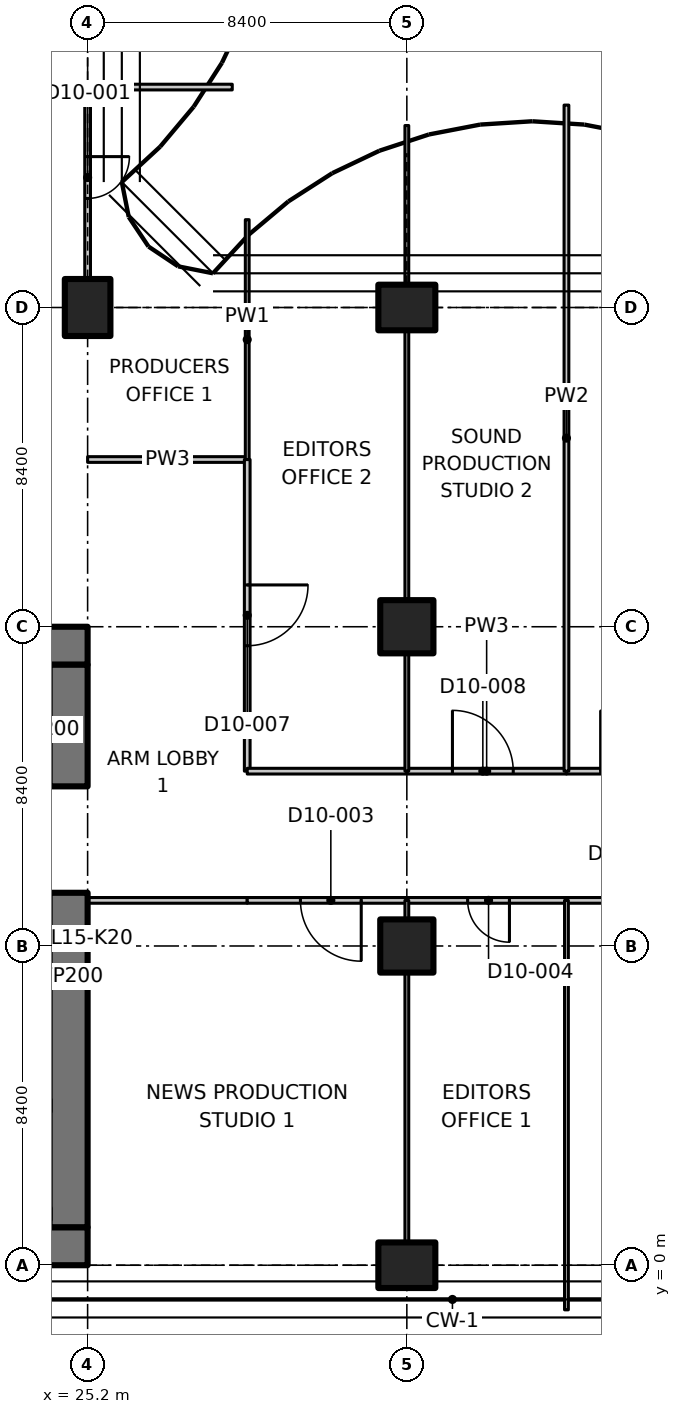
"""IFC4 building model, lengths in metres.
Left out: names, types, materials, properties, quantities, classifications, styles, units other than length and angle.
Written with IfcOpenShell. Run it as: python <this file> out.ifc"""

import sys

from ifc_helpers import new_model, si_unit, direction, frame, frame_2d, origin, origin_2d, place, context, subcontext, project, spatial, polyline, rectangle, outline, extrude, element, fill, save


model = new_model("IFC4")
c1 = context("Model", 3, precision=1e-05, world=origin(), true_north=direction((0.0, 1.0)))
c2 = subcontext(c1, "Body", "Model", "MODEL_VIEW")
j1 = project(units=[si_unit("LENGTHUNIT", "METRE"), si_unit("PLANEANGLEUNIT", "RADIAN")], contexts=[c1])
p1 = place(None, origin())
s1 = spatial("IfcSite", under=j1, at=p1, CompositionType="ELEMENT")
p2 = place(p1, origin())
s2 = spatial("IfcBuilding", under=s1, at=p2, CompositionType="ELEMENT")
p3 = place(p2, frame((0.0, 0.0, 68.9)))
s3 = spatial("IfcBuildingStorey", under=s2, at=p3, CompositionType="ELEMENT", Elevation=68.9)
for number, where, z_axis, x_axis in (
    (1, (25.2, 25.2, 0.0), (0.0, 0.0, 1.0), (1.0, 0.0, 0.0)),
    (2, (33.6, 0.0, 0.0), (0.0, 0.0, 1.0), (0.0, 1.0, 0.0)),
):
    element("IfcColumn", number, at=place(p3, frame(where, z_axis=z_axis, x_axis=x_axis)), inside=s3, PredefinedType="COLUMN", context=c2, shape_type="SweptSolid", body=[
        extrude(rectangle(XDim=1.2, YDim=1.5, at=origin_2d()), origin(), (0.0, 0.0, 1.0), 3.35),
    ])
for number, where, z_axis, x_axis in (
    (3, (33.6, 8.4, 0.0), (0.0, 0.0, 1.0), (1.0, 0.0, 0.0)),
    (4, (33.6, 16.8, 0.0), (0.0, 0.0, 1.0), (1.0, 0.0, 0.0)),
):
    element("IfcColumn", number, at=place(p3, frame(where, z_axis=z_axis, x_axis=x_axis)), inside=s3, PredefinedType="COLUMN", context=c2, shape_type="SweptSolid", body=[
        extrude(rectangle(XDim=1.4, YDim=1.4, at=origin_2d()), origin(), (0.0, 0.0, 1.0), 3.35),
    ])
p4 = place(p3, frame((33.6, 25.2, 0.0), z_axis=(0.0, 0.0, 1.0), x_axis=(0.0, 1.0, 0.0)))
e5 = element("IfcColumn", 5, at=p4, inside=s3, PredefinedType="COLUMN", context=c2, shape_type="SweptSolid", body=[
    extrude(rectangle(XDim=1.2, YDim=1.5, at=origin_2d()), origin(), (0.0, 0.0, 1.0), 3.35),
])
p5 = place(p3, frame((6.936, 0.5, 0.0), z_axis=(0.0, 0.0, 1.0), x_axis=(1.0, 0.0, 0.0)))
e6 = element("IfcWall", 6, at=p5, inside=s3, PredefinedType="SHEAR", context=c2, shape_type="SweptSolid", body=[
    extrude(rectangle(XDim=18.264, YDim=1.0, at=frame_2d((9.132, 0.0))), origin(), (0.0, 0.0, 1.0), 3.35),
])
p6 = place(p3, frame((23.8, 16.3, 0.0), z_axis=(0.0, 0.0, 1.0), x_axis=(1.0, 0.0, 0.0)))
e7 = element("IfcWall", 7, at=p6, inside=s3, PredefinedType="SHEAR", context=c2, shape_type="SweptSolid", body=[
    extrude(rectangle(XDim=1.4, YDim=1.0, at=frame_2d((0.7, 0.0))), origin(), (0.0, 0.0, 1.0), 3.35),
])
p7 = place(p3, frame((24.7, 1.0, 0.0), z_axis=(0.0, 0.0, 1.0), x_axis=(0.0, 1.0, 0.0)))
e8 = element("IfcWall", 8, at=p7, inside=s3, PredefinedType="SHEAR", context=c2, shape_type="SweptSolid", body=[
    extrude(rectangle(XDim=8.8, YDim=1.0, at=frame_2d((4.4, 0.0))), origin(), (0.0, 0.0, 1.0), 3.35),
])
p8 = place(p3, frame((24.7, 12.6, 0.0), z_axis=(0.0, 0.0, 1.0), x_axis=(0.0, 1.0, 0.0)))
e9 = element("IfcWall", 9, at=p8, inside=s3, PredefinedType="SHEAR", context=c2, shape_type="SweptSolid", body=[
    extrude(rectangle(XDim=3.2, YDim=1.0, at=frame_2d((1.6, 0.0))), origin(), (0.0, 0.0, 1.0), 3.35),
])
for number, where, z_axis, x_axis in (
    (10, (25.2, 21.2, 0.0), (0.0, 0.0, 1.0), (1.0, 0.0, 0.0)),
    (11, (29.4, 9.6, 0.0), (0.0, 0.0, 1.0), (-1.0, 0.0, 0.0)),
):
    element("IfcWall", number, at=place(p3, frame(where, z_axis=z_axis, x_axis=x_axis)), inside=s3, PredefinedType="PARTITIONING", context=c2, shape_type="SweptSolid", body=[
        extrude(rectangle(XDim=4.2, YDim=0.15, at=frame_2d((2.1, 0.0))), origin(), (0.0, 0.0, 1.0), 3.33),
    ])
p9 = place(p3, frame((29.4, 21.2, 0.0), z_axis=(0.0, 0.0, 1.0), x_axis=(0.0, -1.0, 0.0)))
e12 = element("IfcWall", 12, at=p9, inside=s3, PredefinedType="PARTITIONING", context=c2, shape_type="SweptSolid", body=[
    extrude(rectangle(XDim=8.2, YDim=0.15, at=frame_2d((4.1, 0.0))), origin(), (0.0, 0.0, 1.0), 3.33),
])
p10 = place(p9, frame((3.3, 0.0, 0.0)))
e13 = element("IfcOpeningElement", 13, at=p10, cuts=e12, PredefinedType="OPENING", context=c2, shape_type="SweptSolid", body=[
    extrude(rectangle(XDim=1.6, YDim=2.1, at=frame_2d((0.8, 1.05))), frame((0.0, 0.085, 0.0), z_axis=(0.0, -1.0, 0.0), x_axis=(1.0, 0.0, 0.0)), (0.0, 0.0, 1.0), 0.17),
])
p11 = place(p3, frame((29.4, 27.511, 0.0), z_axis=(0.0, 0.0, 1.0), x_axis=(0.0, -1.0, 0.0)))
e14 = element("IfcWall", 14, at=p11, inside=s3, PredefinedType="PARTITIONING", context=c2, shape_type="SweptSolid", body=[
    extrude(outline(polyline([(0.0, 0.0), (6.311, 0.0), (6.311, 3.33), (2.761, 3.33), (2.759, 2.98), (1.863, 2.98), (1.861, 3.33), (0.236, 3.33), (0.0, 3.33), (0.0, 0.0)])), frame((0.0, 0.05, 0.0), z_axis=(0.0, -1.0, 0.0), x_axis=(1.0, 0.0, 0.0)), (0.0, 0.0, 1.0), 0.1),
])
p12 = place(p3, frame((25.2, 31.0, 0.0), z_axis=(0.0, 0.0, 1.0), x_axis=(0.0, -1.0, 0.0)))
e15 = element("IfcWall", 15, at=p12, inside=s3, PredefinedType="PARTITIONING", context=c2, shape_type="SweptSolid", body=[
    extrude(outline(polyline([(0.0, 0.0), (5.03, 0.0), (5.03, 2.98), (0.0, 2.98), (0.0, 0.0)])), frame((0.0, 0.075, 0.0), z_axis=(0.0, -1.0, 0.0), x_axis=(1.0, 0.0, 0.0)), (0.0, 0.0, 1.0), 0.15),
])
p13 = place(p12, frame((1.83, 0.0, 0.0)))
e16 = element("IfcOpeningElement", 16, at=p13, cuts=e15, PredefinedType="OPENING", context=c2, shape_type="SweptSolid", body=[
    extrude(rectangle(XDim=1.1, YDim=2.1, at=frame_2d((0.55, 1.05))), frame((0.0, 0.085, 0.0), z_axis=(0.0, -1.0, 0.0), x_axis=(1.0, 0.0, 0.0)), (0.0, 0.0, 1.0), 0.17),
])
p14 = place(p3, frame((25.2, 31.0, 0.0), z_axis=(0.0, 0.0, 1.0), x_axis=(1.0, 0.0, 0.0)))
e17 = element("IfcWall", 17, at=p14, inside=s3, PredefinedType="PARTITIONING", context=c2, shape_type="SweptSolid", body=[
    extrude(rectangle(XDim=3.806, YDim=0.15, at=frame_2d((1.903, 0.0))), origin(), (0.0, 0.0, 1.0), 2.98),
])
p15 = place(p3, frame((33.6, 9.6, 0.0), z_axis=(0.0, 0.0, 1.0), x_axis=(-1.0, 0.0, 0.0)))
e18 = element("IfcWall", 18, at=p15, inside=s3, PredefinedType="PARTITIONING", context=c2, shape_type="SweptSolid", body=[
    extrude(rectangle(XDim=4.2, YDim=0.15, at=frame_2d((2.1, 0.0))), origin(), (0.0, 0.0, 1.0), 3.33),
])
p16 = place(p15, frame((1.2, 0.0, 0.0)))
e19 = element("IfcOpeningElement", 19, at=p16, cuts=e18, PredefinedType="OPENING", context=c2, shape_type="SweptSolid", body=[
    extrude(rectangle(XDim=1.6, YDim=2.1, at=frame_2d((0.8, 1.05))), frame((0.0, 0.085, 0.0), z_axis=(0.0, -1.0, 0.0), x_axis=(1.0, 0.0, 0.0)), (0.0, 0.0, 1.0), 0.17),
])
p17 = place(p3, frame((37.8, 9.6, 0.0), z_axis=(0.0, 0.0, 1.0), x_axis=(-1.0, 0.0, 0.0)))
e20 = element("IfcWall", 20, at=p17, inside=s3, PredefinedType="PARTITIONING", context=c2, shape_type="SweptSolid", body=[
    extrude(rectangle(XDim=4.2, YDim=0.15, at=frame_2d((2.1, 0.0))), origin(), (0.0, 0.0, 1.0), 3.33),
])
p18 = place(p17, frame((1.5, 0.0, 0.0)))
e21 = element("IfcOpeningElement", 21, at=p18, cuts=e20, PredefinedType="OPENING", context=c2, shape_type="SweptSolid", body=[
    extrude(rectangle(XDim=1.1, YDim=2.1, at=frame_2d((0.55, 1.05))), frame((0.0, 0.085, 0.0), z_axis=(0.0, -1.0, 0.0), x_axis=(1.0, 0.0, 0.0)), (0.0, 0.0, 1.0), 0.17),
])
p19 = place(p3, frame((54.6, 9.6, 0.0), z_axis=(0.0, 0.0, 1.0), x_axis=(-1.0, 0.0, 0.0)))
e22 = element("IfcWall", 22, at=p19, inside=s3, PredefinedType="PARTITIONING", context=c2, shape_type="SweptSolid", body=[
    extrude(rectangle(XDim=16.8, YDim=0.15, at=frame_2d((8.4, 0.0))), origin(), (0.0, 0.0, 1.0), 3.33),
])
p20 = place(p19, frame((7.5, 0.0, 0.0)))
e23 = element("IfcOpeningElement", 23, at=p20, cuts=e22, PredefinedType="OPENING", context=c2, shape_type="SweptSolid", body=[
    extrude(rectangle(XDim=2.0, YDim=2.4, at=frame_2d((1.0, 1.2))), frame((0.0, 0.085, 0.0), z_axis=(0.0, -1.0, 0.0), x_axis=(1.0, 0.0, 0.0)), (0.0, 0.0, 1.0), 0.17),
])
p21 = place(p3, frame((29.4, 13.0, 0.0), z_axis=(0.0, 0.0, 1.0), x_axis=(1.0, 0.0, 0.0)))
e24 = element("IfcWall", 24, at=p21, inside=s3, PredefinedType="PARTITIONING", context=c2, shape_type="SweptSolid", body=[
    extrude(rectangle(XDim=4.2, YDim=0.15, at=frame_2d((2.1, 0.0))), origin(), (0.0, 0.0, 1.0), 3.33),
])
p22 = place(p3, frame((33.6, 13.0, 0.0), z_axis=(0.0, 0.0, 1.0), x_axis=(1.0, 0.0, 0.0)))
e25 = element("IfcWall", 25, at=p22, inside=s3, PredefinedType="PARTITIONING", context=c2, shape_type="SweptSolid", body=[
    extrude(rectangle(XDim=4.2, YDim=0.15, at=frame_2d((2.1, 0.0))), origin(), (0.0, 0.0, 1.0), 3.33),
])
p23 = place(p22, frame((1.2, 0.0, 0.0)))
e26 = element("IfcOpeningElement", 26, at=p23, cuts=e25, PredefinedType="OPENING", context=c2, shape_type="SweptSolid", body=[
    extrude(rectangle(XDim=1.6, YDim=2.1, at=frame_2d((0.8, 1.05))), frame((0.0, 0.085, 0.0), z_axis=(0.0, -1.0, 0.0), x_axis=(1.0, 0.0, 0.0)), (0.0, 0.0, 1.0), 0.17),
])
p24 = place(p3, frame((37.8, 13.0, 0.0), z_axis=(0.0, 0.0, 1.0), x_axis=(1.0, 0.0, 0.0)))
e27 = element("IfcWall", 27, at=p24, inside=s3, PredefinedType="PARTITIONING", context=c2, shape_type="SweptSolid", body=[
    extrude(rectangle(XDim=3.4, YDim=0.15, at=frame_2d((1.7, 0.0))), origin(), (0.0, 0.0, 1.0), 3.33),
])
p25 = place(p24, frame((0.9, 0.0, 0.0)))
e28 = element("IfcOpeningElement", 28, at=p25, cuts=e27, PredefinedType="OPENING", context=c2, shape_type="SweptSolid", body=[
    extrude(rectangle(XDim=1.6, YDim=2.1, at=frame_2d((0.8, 1.05))), frame((0.0, 0.085, 0.0), z_axis=(0.0, -1.0, 0.0), x_axis=(1.0, 0.0, 0.0)), (0.0, 0.0, 1.0), 0.17),
])
p26 = place(p3, frame((33.6, 9.6, 0.0), z_axis=(0.0, 0.0, 1.0), x_axis=(0.0, -1.0, 0.0)))
e29 = element("IfcWall", 29, at=p26, inside=s3, PredefinedType="PARTITIONING", context=c2, shape_type="SweptSolid", body=[
    extrude(rectangle(XDim=0.48, YDim=0.1, at=frame_2d((0.24, 0.0))), origin(), (0.0, 0.0, 1.0), 3.33),
])
p27 = place(p3, frame((33.6, 7.68, 0.0), z_axis=(0.0, 0.0, 1.0), x_axis=(0.0, -1.0, 0.0)))
e30 = element("IfcWall", 30, at=p27, inside=s3, PredefinedType="PARTITIONING", context=c2, shape_type="SweptSolid", body=[
    extrude(rectangle(XDim=7.06, YDim=0.1, at=frame_2d((3.53, 0.0))), origin(), (0.0, 0.0, 1.0), 3.33),
])
p28 = place(p3, frame((37.8, 9.6, 0.0), z_axis=(0.0, 0.0, 1.0), x_axis=(0.0, -1.0, 0.0)))
e31 = element("IfcWall", 31, at=p28, inside=s3, PredefinedType="PARTITIONING", context=c2, shape_type="SweptSolid", body=[
    extrude(outline(polyline([(0.0, 0.0), (10.774, 0.0), (10.774, 3.33), (10.7, 3.33), (10.05, 3.33), (10.048, 2.98), (9.152, 2.98), (9.15, 3.33), (0.0, 3.33), (0.0, 0.0)])), frame((0.0, 0.05, 0.0), z_axis=(0.0, -1.0, 0.0), x_axis=(1.0, 0.0, 0.0)), (0.0, 0.0, 1.0), 0.1),
])
p29 = place(p3, frame((33.6, 29.988, 0.0), z_axis=(0.0, 0.0, 1.0), x_axis=(0.0, -1.0, 0.0)))
e32 = element("IfcWall", 32, at=p29, inside=s3, PredefinedType="PARTITIONING", context=c2, shape_type="SweptSolid", body=[
    extrude(rectangle(XDim=4.168, YDim=0.1, at=frame_2d((2.084, 0.0))), origin(), (0.0, 0.0, 1.0), 2.98),
])
p30 = place(p3, frame((33.6, 24.58, 0.0), z_axis=(0.0, 0.0, 1.0), x_axis=(0.0, -1.0, 0.0)))
e33 = element("IfcWall", 33, at=p30, inside=s3, PredefinedType="PARTITIONING", context=c2, shape_type="SweptSolid", body=[
    extrude(rectangle(XDim=7.06, YDim=0.1, at=frame_2d((3.53, 0.0))), origin(), (0.0, 0.0, 1.0), 3.33),
])
p31 = place(p3, frame((33.6, 16.08, 0.0), z_axis=(0.0, 0.0, 1.0), x_axis=(0.0, -1.0, 0.0)))
e34 = element("IfcWall", 34, at=p31, inside=s3, PredefinedType="PARTITIONING", context=c2, shape_type="SweptSolid", body=[
    extrude(rectangle(XDim=3.08, YDim=0.1, at=frame_2d((1.54, 0.0))), origin(), (0.0, 0.0, 1.0), 3.33),
])
p32 = place(p3, frame((37.8, 30.526, 0.0), z_axis=(0.0, 0.0, 1.0), x_axis=(0.0, -1.0, 0.0)))
e35 = element("IfcWall", 35, at=p32, inside=s3, PredefinedType="PARTITIONING", context=c2, shape_type="SweptSolid", body=[
    extrude(outline(polyline([(0.0, 0.0), (17.526, 0.0), (17.526, 3.33), (5.776, 3.33), (5.774, 2.98), (4.878, 2.98), (4.876, 3.33), (0.283, 3.33), (0.0, 3.33), (0.0, 0.0)])), frame((0.0, 0.062, 0.0), z_axis=(0.0, -1.0, 0.0), x_axis=(1.0, 0.0, 0.0)), (0.0, 0.0, 1.0), 0.125),
])
p33 = place(p13, origin())
e36 = element("IfcDoor", 36, at=p33, inside=s3, OperationType="SINGLE_SWING_RIGHT", PredefinedType="DOOR", context=c2, shape_type="SweptSolid", body=[
    extrude(rectangle(XDim=1.1, YDim=2.1, at=frame_2d((0.55, 1.05))), frame((0.0, 0.025, 0.0), z_axis=(0.0, -1.0, 0.0), x_axis=(1.0, 0.0, 0.0)), (0.0, 0.0, 1.0), 0.05),
])
fill(e16, e36)
p34 = place(p16, origin())
e37 = element("IfcDoor", 37, at=p34, inside=s3, OperationType="DOUBLE_DOOR_SINGLE_SWING", PredefinedType="DOOR", context=c2, shape_type="SweptSolid", body=[
    extrude(rectangle(XDim=1.6, YDim=2.1, at=frame_2d((0.8, 1.05))), frame((0.0, 0.025, 0.0), z_axis=(0.0, -1.0, 0.0), x_axis=(1.0, 0.0, 0.0)), (0.0, 0.0, 1.0), 0.05),
])
fill(e19, e37)
p35 = place(p18, origin())
e38 = element("IfcDoor", 38, at=p35, inside=s3, OperationType="SINGLE_SWING_LEFT", PredefinedType="DOOR", context=c2, shape_type="SweptSolid", body=[
    extrude(rectangle(XDim=1.1, YDim=2.1, at=frame_2d((0.55, 1.05))), frame((0.0, 0.025, 0.0), z_axis=(0.0, -1.0, 0.0), x_axis=(1.0, 0.0, 0.0)), (0.0, 0.0, 1.0), 0.05),
])
fill(e21, e38)
p36 = place(p10, origin())
e39 = element("IfcDoor", 39, at=p36, inside=s3, OperationType="DOUBLE_DOOR_SINGLE_SWING", PredefinedType="DOOR", context=c2, shape_type="SweptSolid", body=[
    extrude(rectangle(XDim=1.6, YDim=2.1, at=frame_2d((0.8, 1.05))), frame((0.0, 0.025, 0.0), z_axis=(0.0, -1.0, 0.0), x_axis=(1.0, 0.0, 0.0)), (0.0, 0.0, 1.0), 0.05),
])
fill(e13, e39)
p37 = place(p23, origin())
e40 = element("IfcDoor", 40, at=p37, inside=s3, OperationType="DOUBLE_DOOR_SINGLE_SWING", PredefinedType="DOOR", context=c2, shape_type="SweptSolid", body=[
    extrude(rectangle(XDim=1.6, YDim=2.1, at=frame_2d((0.8, 1.05))), frame((0.0, 0.025, 0.0), z_axis=(0.0, -1.0, 0.0), x_axis=(1.0, 0.0, 0.0)), (0.0, 0.0, 1.0), 0.05),
])
fill(e26, e40)
p38 = place(p25, origin())
e41 = element("IfcDoor", 41, at=p38, inside=s3, OperationType="DOUBLE_DOOR_SINGLE_SWING", PredefinedType="DOOR", context=c2, shape_type="SweptSolid", body=[
    extrude(rectangle(XDim=1.6, YDim=2.1, at=frame_2d((0.8, 1.05))), frame((0.0, 0.025, 0.0), z_axis=(0.0, -1.0, 0.0), x_axis=(1.0, 0.0, 0.0)), (0.0, 0.0, 1.0), 0.05),
])
fill(e28, e41)
save(model, sys.argv[1])
